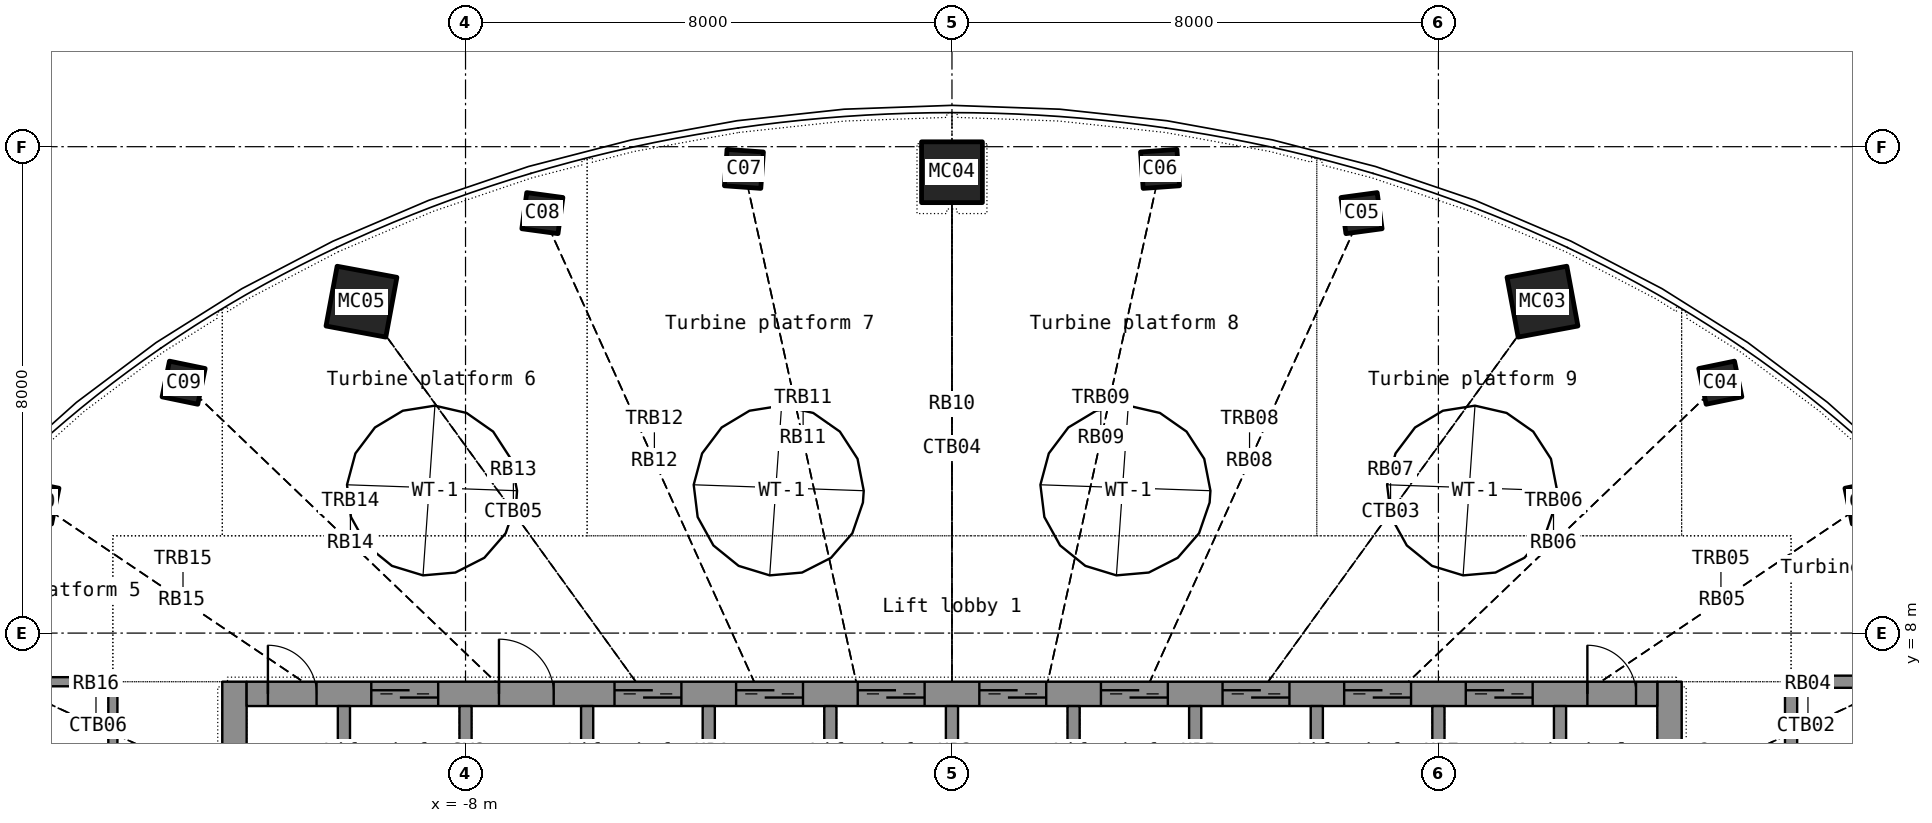
"""IFC4 building model, lengths in metres.
Left out: names, types, materials, properties, quantities, classifications, styles, units other than length and angle.
Written with IfcOpenShell. Run it as: python <this file> out.ifc"""

import sys

from ifc_helpers import new_model, si_unit, direction, frame, frame_2d, origin, origin_2d, place, context, subcontext, project, spatial, rectangle, hollow_rectangle, extrude, element, fill, save


model = new_model("IFC4")
c1 = context("Model", 3, precision=1e-05, world=origin(), true_north=direction((0.0, 1.0)))
c2 = subcontext(c1, "Body", "Model", "MODEL_VIEW")
j1 = project(units=[si_unit("LENGTHUNIT", "METRE"), si_unit("PLANEANGLEUNIT", "RADIAN")], contexts=[c1])
p1 = place(None, origin())
s1 = spatial("IfcSite", under=j1, at=p1, CompositionType="ELEMENT")
p2 = place(p1, origin())
s2 = spatial("IfcBuilding", under=s1, at=p2, CompositionType="ELEMENT")
p3 = place(p2, frame((0.0, 0.0, 265.2)))
s3 = spatial("IfcBuildingStorey", under=s2, at=p3, CompositionType="ELEMENT", Elevation=265.2)
p4 = place(p3, frame((15.041, 10.149, 0.0), z_axis=(-0.026511305, -0.018201791, 0.999482789), x_axis=(0.721084308, -0.692816746, 0.006509747)))
e1 = element("IfcColumn", 1, at=p4, inside=s3, PredefinedType="COLUMN", context=c2, shape_type="SweptSolid", body=[
    extrude(hollow_rectangle(XDim=0.6, YDim=0.6, WallThickness=0.025, at=origin_2d()), origin(), (0.0, 0.0, 1.0), 7.404),
])
p5 = place(p3, frame((12.636, 12.118, 0.0), z_axis=(-0.022225407, -0.021730776, 0.999516786), x_axis=(0.829477504, -0.558504573, 0.006301782)))
e2 = element("IfcColumn", 2, at=p5, inside=s3, PredefinedType="COLUMN", context=c2, shape_type="SweptSolid", body=[
    extrude(hollow_rectangle(XDim=0.6, YDim=0.6, WallThickness=0.025, at=origin_2d()), origin(), (0.0, 0.0, 1.0), 7.404),
])
p6 = place(p3, frame((9.711, 13.451, 0.0), z_axis=(-0.017279668, -0.02453449, 0.999549635), x_axis=(0.908911912, -0.416952184, 0.005478454)))
e3 = element("IfcColumn", 3, at=p6, inside=s3, PredefinedType="COLUMN", context=c2, shape_type="SweptSolid", body=[
    extrude(hollow_rectangle(XDim=1.0, YDim=1.0, WallThickness=0.032, at=origin_2d()), origin(), (0.0, 0.0, 1.0), 7.404),
])
p7 = place(p3, frame((6.736, 14.907, 0.0), z_axis=(-0.011805877, -0.026645666, 0.999575225), x_axis=(0.960364691, -0.278719123, 0.003912953)))
e4 = element("IfcColumn", 4, at=p7, inside=s3, PredefinedType="COLUMN", context=c2, shape_type="SweptSolid", body=[
    extrude(hollow_rectangle(XDim=0.6, YDim=0.6, WallThickness=0.025, at=origin_2d()), origin(), (0.0, 0.0, 1.0), 7.403),
])
p8 = place(p3, frame((3.422, 15.635, 0.0), z_axis=(-0.006001975, -0.027899292, 0.99959272), x_axis=(0.990225435, -0.139461007, 0.002053282)))
e5 = element("IfcColumn", 5, at=p8, inside=s3, PredefinedType="COLUMN", context=c2, shape_type="SweptSolid", body=[
    extrude(hollow_rectangle(XDim=0.6, YDim=0.6, WallThickness=0.025, at=origin_2d()), origin(), (0.0, 0.0, 1.0), 7.403),
])
p9 = place(p3, frame((0.0, 15.58, 0.0), z_axis=(0.0, -0.028361125, 0.999597742), x_axis=(1.0, 0.0, 0.0)))
e6 = element("IfcColumn", 6, at=p9, inside=s3, PredefinedType="COLUMN", context=c2, shape_type="SweptSolid", body=[
    extrude(hollow_rectangle(XDim=1.0, YDim=1.0, WallThickness=0.032, at=origin_2d()), origin(), (0.0, 0.0, 1.0), 7.403),
])
p10 = place(p3, frame((-3.422, 15.635, 0.0), z_axis=(0.006001975, -0.027899292, 0.99959272), x_axis=(0.990225435, 0.139461007, -0.002053282)))
e7 = element("IfcColumn", 7, at=p10, inside=s3, PredefinedType="COLUMN", context=c2, shape_type="SweptSolid", body=[
    extrude(hollow_rectangle(XDim=0.6, YDim=0.6, WallThickness=0.025, at=origin_2d()), origin(), (0.0, 0.0, 1.0), 7.403),
])
p11 = place(p3, frame((-6.736, 14.907, 0.0), z_axis=(0.011805877, -0.026645666, 0.999575225), x_axis=(0.960364691, 0.278719123, -0.003912953)))
e8 = element("IfcColumn", 8, at=p11, inside=s3, PredefinedType="COLUMN", context=c2, shape_type="SweptSolid", body=[
    extrude(hollow_rectangle(XDim=0.6, YDim=0.6, WallThickness=0.025, at=origin_2d()), origin(), (0.0, 0.0, 1.0), 7.403),
])
p12 = place(p3, frame((-9.711, 13.451, 0.0), z_axis=(0.017279668, -0.02453449, 0.999549635), x_axis=(0.908911912, 0.416952184, -0.005478454)))
e9 = element("IfcColumn", 9, at=p12, inside=s3, PredefinedType="COLUMN", context=c2, shape_type="SweptSolid", body=[
    extrude(hollow_rectangle(XDim=1.0, YDim=1.0, WallThickness=0.032, at=origin_2d()), origin(), (0.0, 0.0, 1.0), 7.404),
])
p13 = place(p3, frame((-12.636, 12.118, 0.0), z_axis=(0.022225407, -0.021730776, 0.999516786), x_axis=(0.829477504, 0.558504573, -0.006301782)))
e10 = element("IfcColumn", 10, at=p13, inside=s3, PredefinedType="COLUMN", context=c2, shape_type="SweptSolid", body=[
    extrude(hollow_rectangle(XDim=0.6, YDim=0.6, WallThickness=0.025, at=origin_2d()), origin(), (0.0, 0.0, 1.0), 7.404),
])
p14 = place(p3, frame((-15.041, 10.149, 0.0), z_axis=(0.026511305, -0.018201791, 0.999482789), x_axis=(0.721084308, 0.692816746, -0.006509747)))
e11 = element("IfcColumn", 11, at=p14, inside=s3, PredefinedType="COLUMN", context=c2, shape_type="SweptSolid", body=[
    extrude(hollow_rectangle(XDim=0.6, YDim=0.6, WallThickness=0.025, at=origin_2d()), origin(), (0.0, 0.0, 1.0), 7.404),
])
p15 = place(p3, frame((-11.8, -7.2, 0.0), z_axis=(0.0, 0.0, 1.0), x_axis=(0.0, 1.0, 0.0)))
e12 = element("IfcWall", 12, at=p15, inside=s3, PredefinedType="SHEAR", context=c2, shape_type="SweptSolid", body=[
    extrude(rectangle(XDim=14.4, YDim=0.4, at=frame_2d((7.2, 0.0))), origin(), (0.0, 0.0, 1.0), 6.9),
])
p16 = place(p15, frame((6.5, 0.0, 0.0)))
e13 = element("IfcOpeningElement", 13, at=p16, cuts=e12, PredefinedType="OPENING", context=c2, shape_type="SweptSolid", body=[
    extrude(rectangle(XDim=1.4, YDim=2.2, at=frame_2d((0.7, 1.1))), frame((0.0, 0.21, 0.0), z_axis=(0.0, -1.0, 0.0), x_axis=(1.0, 0.0, 0.0)), (0.0, 0.0, 1.0), 0.42),
])
p17 = place(p3, frame((11.8, -7.2, 0.0), z_axis=(0.0, 0.0, 1.0), x_axis=(0.0, 1.0, 0.0)))
e14 = element("IfcWall", 14, at=p17, inside=s3, PredefinedType="SHEAR", context=c2, shape_type="SweptSolid", body=[
    extrude(rectangle(XDim=14.4, YDim=0.4, at=frame_2d((7.2, 0.0))), origin(), (0.0, 0.0, 1.0), 6.9),
])
p18 = place(p17, frame((6.5, 0.0, 0.0)))
e15 = element("IfcOpeningElement", 15, at=p18, cuts=e14, PredefinedType="OPENING", context=c2, shape_type="SweptSolid", body=[
    extrude(rectangle(XDim=1.4, YDim=2.2, at=frame_2d((0.7, 1.1))), frame((0.0, 0.21, 0.0), z_axis=(0.0, -1.0, 0.0), x_axis=(1.0, 0.0, 0.0)), (0.0, 0.0, 1.0), 0.42),
])
p19 = place(p3, frame((-11.6, 7.0, 0.0), z_axis=(0.0, 0.0, 1.0), x_axis=(1.0, 0.0, 0.0)))
e16 = element("IfcWall", 16, at=p19, inside=s3, PredefinedType="SHEAR", context=c2, shape_type="SweptSolid", body=[
    extrude(rectangle(XDim=23.2, YDim=0.4, at=frame_2d((11.6, 0.0))), origin(), (0.0, 0.0, 1.0), 6.9),
])
p20 = place(p19, frame((2.05, 0.0, 0.0)))
e17 = element("IfcOpeningElement", 17, at=p20, cuts=e16, PredefinedType="OPENING", context=c2, shape_type="SweptSolid", body=[
    extrude(rectangle(XDim=1.1, YDim=2.2, at=frame_2d((0.55, 1.1))), frame((0.0, 0.21, 0.0), z_axis=(0.0, -1.0, 0.0), x_axis=(1.0, 0.0, 0.0)), (0.0, 0.0, 1.0), 0.42),
])
p21 = place(p19, frame((6.05, 0.0, 0.0)))
e18 = element("IfcOpeningElement", 18, at=p21, cuts=e16, PredefinedType="OPENING", context=c2, shape_type="SweptSolid", body=[
    extrude(rectangle(XDim=1.1, YDim=2.2, at=frame_2d((0.55, 1.1))), frame((0.0, 0.21, 0.0), z_axis=(0.0, -1.0, 0.0), x_axis=(1.0, 0.0, 0.0)), (0.0, 0.0, 1.0), 0.42),
])
p22 = place(p19, frame((8.05, 0.0, 0.0)))
e19 = element("IfcOpeningElement", 19, at=p22, cuts=e16, PredefinedType="OPENING", context=c2, shape_type="SweptSolid", body=[
    extrude(rectangle(XDim=1.1, YDim=2.2, at=frame_2d((0.55, 1.1))), frame((0.0, 0.21, 0.0), z_axis=(0.0, -1.0, 0.0), x_axis=(1.0, 0.0, 0.0)), (0.0, 0.0, 1.0), 0.42),
])
p23 = place(p19, frame((10.05, 0.0, 0.0)))
e20 = element("IfcOpeningElement", 20, at=p23, cuts=e16, PredefinedType="OPENING", context=c2, shape_type="SweptSolid", body=[
    extrude(rectangle(XDim=1.1, YDim=2.2, at=frame_2d((0.55, 1.1))), frame((0.0, 0.21, 0.0), z_axis=(0.0, -1.0, 0.0), x_axis=(1.0, 0.0, 0.0)), (0.0, 0.0, 1.0), 0.42),
])
p24 = place(p19, frame((12.05, 0.0, 0.0)))
e21 = element("IfcOpeningElement", 21, at=p24, cuts=e16, PredefinedType="OPENING", context=c2, shape_type="SweptSolid", body=[
    extrude(rectangle(XDim=1.1, YDim=2.2, at=frame_2d((0.55, 1.1))), frame((0.0, 0.21, 0.0), z_axis=(0.0, -1.0, 0.0), x_axis=(1.0, 0.0, 0.0)), (0.0, 0.0, 1.0), 0.42),
])
p25 = place(p19, frame((14.05, 0.0, 0.0)))
e22 = element("IfcOpeningElement", 22, at=p25, cuts=e16, PredefinedType="OPENING", context=c2, shape_type="SweptSolid", body=[
    extrude(rectangle(XDim=1.1, YDim=2.2, at=frame_2d((0.55, 1.1))), frame((0.0, 0.21, 0.0), z_axis=(0.0, -1.0, 0.0), x_axis=(1.0, 0.0, 0.0)), (0.0, 0.0, 1.0), 0.42),
])
p26 = place(p19, frame((16.05, 0.0, 0.0)))
e23 = element("IfcOpeningElement", 23, at=p26, cuts=e16, PredefinedType="OPENING", context=c2, shape_type="SweptSolid", body=[
    extrude(rectangle(XDim=1.1, YDim=2.2, at=frame_2d((0.55, 1.1))), frame((0.0, 0.21, 0.0), z_axis=(0.0, -1.0, 0.0), x_axis=(1.0, 0.0, 0.0)), (0.0, 0.0, 1.0), 0.42),
])
p27 = place(p19, frame((18.05, 0.0, 0.0)))
e24 = element("IfcOpeningElement", 24, at=p27, cuts=e16, PredefinedType="OPENING", context=c2, shape_type="SweptSolid", body=[
    extrude(rectangle(XDim=1.1, YDim=2.2, at=frame_2d((0.55, 1.1))), frame((0.0, 0.21, 0.0), z_axis=(0.0, -1.0, 0.0), x_axis=(1.0, 0.0, 0.0)), (0.0, 0.0, 1.0), 0.42),
])
p28 = place(p19, frame((20.05, 0.0, 0.0)))
e25 = element("IfcOpeningElement", 25, at=p28, cuts=e16, PredefinedType="OPENING", context=c2, shape_type="SweptSolid", body=[
    extrude(rectangle(XDim=1.1, YDim=2.2, at=frame_2d((0.55, 1.1))), frame((0.0, 0.21, 0.0), z_axis=(0.0, -1.0, 0.0), x_axis=(1.0, 0.0, 0.0)), (0.0, 0.0, 1.0), 0.42),
])
p29 = place(p19, frame((4.15, 0.0, 0.0)))
e26 = element("IfcOpeningElement", 26, at=p29, cuts=e16, PredefinedType="OPENING", context=c2, shape_type="SweptSolid", body=[
    extrude(rectangle(XDim=0.9, YDim=2.1, at=frame_2d((0.45, 1.05))), frame((0.0, 0.21, 0.0), z_axis=(0.0, -1.0, 0.0), x_axis=(1.0, 0.0, 0.0)), (0.0, 0.0, 1.0), 0.42),
])
p30 = place(p19, frame((0.35, 0.0, 0.0)))
e27 = element("IfcOpeningElement", 27, at=p30, cuts=e16, PredefinedType="OPENING", context=c2, shape_type="SweptSolid", body=[
    extrude(rectangle(XDim=0.8, YDim=2.05, at=frame_2d((0.4, 1.025))), frame((0.0, 0.21, 0.0), z_axis=(0.0, -1.0, 0.0), x_axis=(1.0, 0.0, 0.0)), (0.0, 0.0, 1.0), 0.42),
])
p31 = place(p19, frame((22.05, 0.0, 0.0)))
e28 = element("IfcOpeningElement", 28, at=p31, cuts=e16, PredefinedType="OPENING", context=c2, shape_type="SweptSolid", body=[
    extrude(rectangle(XDim=0.8, YDim=2.05, at=frame_2d((0.4, 1.025))), frame((0.0, 0.21, 0.0), z_axis=(0.0, -1.0, 0.0), x_axis=(1.0, 0.0, 0.0)), (0.0, 0.0, 1.0), 0.42),
])
for number, where, z_axis, x_axis in (
    (29, (-10.0, 3.9, 0.0), (0.0, 0.0, 1.0), (0.0, 1.0, 0.0)),
    (30, (-8.0, 3.9, 0.0), (0.0, 0.0, 1.0), (0.0, 1.0, 0.0)),
    (31, (-6.0, 3.9, 0.0), (0.0, 0.0, 1.0), (0.0, 1.0, 0.0)),
    (32, (-4.0, 3.9, 0.0), (0.0, 0.0, 1.0), (0.0, 1.0, 0.0)),
    (33, (-2.0, 3.9, 0.0), (0.0, 0.0, 1.0), (0.0, 1.0, 0.0)),
    (34, (0.0, 3.9, 0.0), (0.0, 0.0, 1.0), (0.0, 1.0, 0.0)),
    (35, (2.0, 3.9, 0.0), (0.0, 0.0, 1.0), (0.0, 1.0, 0.0)),
    (36, (4.0, 3.9, 0.0), (0.0, 0.0, 1.0), (0.0, 1.0, 0.0)),
    (37, (6.0, 3.9, 0.0), (0.0, 0.0, 1.0), (0.0, 1.0, 0.0)),
    (38, (8.0, 3.9, 0.0), (0.0, 0.0, 1.0), (0.0, 1.0, 0.0)),
    (39, (10.0, 3.9, 0.0), (0.0, 0.0, 1.0), (0.0, 1.0, 0.0)),
):
    element("IfcWall", number, at=place(p3, frame(where, z_axis=z_axis, x_axis=x_axis)), inside=s3, PredefinedType="SHEAR", context=c2, shape_type="SweptSolid", body=[
        extrude(rectangle(XDim=2.9, YDim=0.2, at=frame_2d((1.45, 0.0))), origin(), (0.0, 0.0, 1.0), 6.9),
    ])
p32 = place(p3, frame((-13.8, 7.2, 0.0), z_axis=(0.0, 0.0, 1.0), x_axis=(0.0, -1.0, 0.0)))
e40 = element("IfcWall", 40, at=p32, inside=s3, PredefinedType="PARTITIONING", context=c2, shape_type="SweptSolid", body=[
    extrude(rectangle(XDim=6.0, YDim=0.15, at=frame_2d((3.0, 0.0))), origin(), (0.0, 0.0, 1.0), 6.1),
])
p33 = place(p3, frame((13.8, 1.2, 0.0), z_axis=(0.0, 0.0, 1.0), x_axis=(0.0, 1.0, 0.0)))
e41 = element("IfcWall", 41, at=p33, inside=s3, PredefinedType="PARTITIONING", context=c2, shape_type="SweptSolid", body=[
    extrude(rectangle(XDim=6.0, YDim=0.2, at=frame_2d((3.0, 0.0))), origin(), (0.0, 0.0, 1.0), 6.1),
])
p34 = place(p3, frame((-13.877, 7.2, 0.0), z_axis=(0.0, 0.0, 1.0), x_axis=(-1.0, 0.0, 0.0)))
e42 = element("IfcWall", 42, at=p34, inside=s3, PredefinedType="PARTITIONING", context=c2, shape_type="SweptSolid", body=[
    extrude(rectangle(XDim=2.546, YDim=0.15, at=frame_2d((1.273, 0.0))), origin(), (0.0, 0.0, 1.0), 6.1),
])
p35 = place(p3, frame((16.398, 7.2, 0.0), z_axis=(0.0, 0.0, 1.0), x_axis=(-1.0, 0.0, 0.0)))
e43 = element("IfcWall", 43, at=p35, inside=s3, PredefinedType="PARTITIONING", context=c2, shape_type="SweptSolid", body=[
    extrude(rectangle(XDim=2.496, YDim=0.2, at=frame_2d((1.248, 0.0))), origin(), (0.0, 0.0, 1.0), 6.1),
])
p36 = place(p20, origin())
e44 = element("IfcDoor", 44, at=p36, inside=s3, OperationType="DOUBLE_DOOR_SLIDING", PredefinedType="DOOR", context=c2, shape_type="SweptSolid", body=[
    extrude(rectangle(XDim=1.1, YDim=2.2, at=frame_2d((0.55, 1.1))), frame((0.0, 0.025, 0.0), z_axis=(0.0, -1.0, 0.0), x_axis=(1.0, 0.0, 0.0)), (0.0, 0.0, 1.0), 0.05),
])
fill(e17, e44)
p37 = place(p21, origin())
e45 = element("IfcDoor", 45, at=p37, inside=s3, OperationType="DOUBLE_DOOR_SLIDING", PredefinedType="DOOR", context=c2, shape_type="SweptSolid", body=[
    extrude(rectangle(XDim=1.1, YDim=2.2, at=frame_2d((0.55, 1.1))), frame((0.0, 0.025, 0.0), z_axis=(0.0, -1.0, 0.0), x_axis=(1.0, 0.0, 0.0)), (0.0, 0.0, 1.0), 0.05),
])
fill(e18, e45)
p38 = place(p22, origin())
e46 = element("IfcDoor", 46, at=p38, inside=s3, OperationType="DOUBLE_DOOR_SLIDING", PredefinedType="DOOR", context=c2, shape_type="SweptSolid", body=[
    extrude(rectangle(XDim=1.1, YDim=2.2, at=frame_2d((0.55, 1.1))), frame((0.0, 0.025, 0.0), z_axis=(0.0, -1.0, 0.0), x_axis=(1.0, 0.0, 0.0)), (0.0, 0.0, 1.0), 0.05),
])
fill(e19, e46)
p39 = place(p23, origin())
e47 = element("IfcDoor", 47, at=p39, inside=s3, OperationType="DOUBLE_DOOR_SLIDING", PredefinedType="DOOR", context=c2, shape_type="SweptSolid", body=[
    extrude(rectangle(XDim=1.1, YDim=2.2, at=frame_2d((0.55, 1.1))), frame((0.0, 0.025, 0.0), z_axis=(0.0, -1.0, 0.0), x_axis=(1.0, 0.0, 0.0)), (0.0, 0.0, 1.0), 0.05),
])
fill(e20, e47)
p40 = place(p24, origin())
e48 = element("IfcDoor", 48, at=p40, inside=s3, OperationType="DOUBLE_DOOR_SLIDING", PredefinedType="DOOR", context=c2, shape_type="SweptSolid", body=[
    extrude(rectangle(XDim=1.1, YDim=2.2, at=frame_2d((0.55, 1.1))), frame((0.0, 0.025, 0.0), z_axis=(0.0, -1.0, 0.0), x_axis=(1.0, 0.0, 0.0)), (0.0, 0.0, 1.0), 0.05),
])
fill(e21, e48)
p41 = place(p25, origin())
e49 = element("IfcDoor", 49, at=p41, inside=s3, OperationType="DOUBLE_DOOR_SLIDING", PredefinedType="DOOR", context=c2, shape_type="SweptSolid", body=[
    extrude(rectangle(XDim=1.1, YDim=2.2, at=frame_2d((0.55, 1.1))), frame((0.0, 0.025, 0.0), z_axis=(0.0, -1.0, 0.0), x_axis=(1.0, 0.0, 0.0)), (0.0, 0.0, 1.0), 0.05),
])
fill(e22, e49)
p42 = place(p26, origin())
e50 = element("IfcDoor", 50, at=p42, inside=s3, OperationType="DOUBLE_DOOR_SLIDING", PredefinedType="DOOR", context=c2, shape_type="SweptSolid", body=[
    extrude(rectangle(XDim=1.1, YDim=2.2, at=frame_2d((0.55, 1.1))), frame((0.0, 0.025, 0.0), z_axis=(0.0, -1.0, 0.0), x_axis=(1.0, 0.0, 0.0)), (0.0, 0.0, 1.0), 0.05),
])
fill(e23, e50)
p43 = place(p27, origin())
e51 = element("IfcDoor", 51, at=p43, inside=s3, OperationType="DOUBLE_DOOR_SLIDING", PredefinedType="DOOR", context=c2, shape_type="SweptSolid", body=[
    extrude(rectangle(XDim=1.1, YDim=2.2, at=frame_2d((0.55, 1.1))), frame((0.0, 0.025, 0.0), z_axis=(0.0, -1.0, 0.0), x_axis=(1.0, 0.0, 0.0)), (0.0, 0.0, 1.0), 0.05),
])
fill(e24, e51)
p44 = place(p28, origin())
e52 = element("IfcDoor", 52, at=p44, inside=s3, OperationType="DOUBLE_DOOR_SLIDING", PredefinedType="DOOR", context=c2, shape_type="SweptSolid", body=[
    extrude(rectangle(XDim=1.1, YDim=2.2, at=frame_2d((0.55, 1.1))), frame((0.0, 0.025, 0.0), z_axis=(0.0, -1.0, 0.0), x_axis=(1.0, 0.0, 0.0)), (0.0, 0.0, 1.0), 0.05),
])
fill(e25, e52)
p45 = place(p29, origin())
e53 = element("IfcDoor", 53, at=p45, inside=s3, OperationType="SINGLE_SWING_LEFT", PredefinedType="DOOR", context=c2, shape_type="SweptSolid", body=[
    extrude(rectangle(XDim=0.9, YDim=2.1, at=frame_2d((0.45, 1.05))), frame((0.0, 0.025, 0.0), z_axis=(0.0, -1.0, 0.0), x_axis=(1.0, 0.0, 0.0)), (0.0, 0.0, 1.0), 0.05),
])
fill(e26, e53)
p46 = place(p30, origin())
e54 = element("IfcDoor", 54, at=p46, inside=s3, OperationType="SINGLE_SWING_LEFT", PredefinedType="DOOR", context=c2, shape_type="SweptSolid", body=[
    extrude(rectangle(XDim=0.8, YDim=2.05, at=frame_2d((0.4, 1.025))), frame((0.0, 0.025, 0.0), z_axis=(0.0, -1.0, 0.0), x_axis=(1.0, 0.0, 0.0)), (0.0, 0.0, 1.0), 0.05),
])
fill(e27, e54)
p47 = place(p31, origin())
e55 = element("IfcDoor", 55, at=p47, inside=s3, OperationType="SINGLE_SWING_LEFT", PredefinedType="DOOR", context=c2, shape_type="SweptSolid", body=[
    extrude(rectangle(XDim=0.8, YDim=2.05, at=frame_2d((0.4, 1.025))), frame((0.0, 0.025, 0.0), z_axis=(0.0, -1.0, 0.0), x_axis=(1.0, 0.0, 0.0)), (0.0, 0.0, 1.0), 0.05),
])
fill(e28, e55)
save(model, sys.argv[1])
